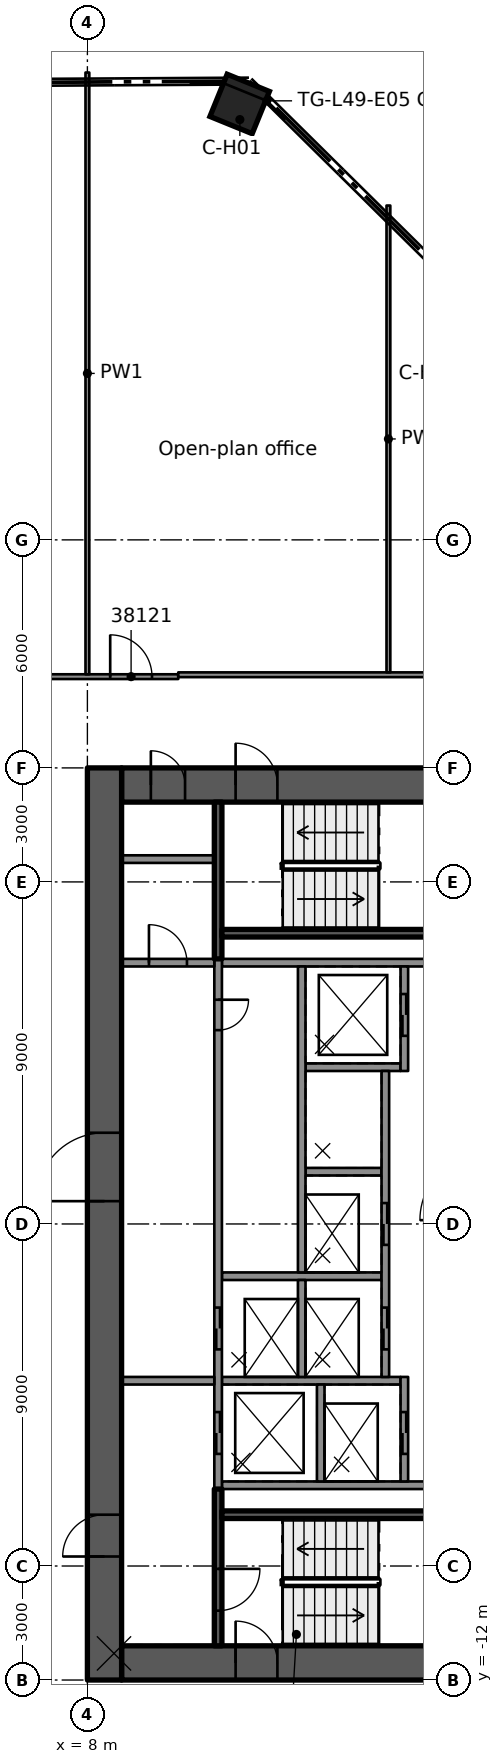
"""IFC4 building model, lengths in metres.
Left out: names, types, materials, properties, quantities, classifications, styles, units other than length and angle.
Written with IfcOpenShell. Run it as: python <this file> out.ifc"""

import sys

from ifc_helpers import new_model, si_unit, direction, frame, frame_2d, origin, origin_2d, place, context, subcontext, project, spatial, rectangle, extrude, element, fill, save


model = new_model("IFC4")
c1 = context("Model", 3, precision=1e-05, world=origin(), true_north=direction((0.0, 1.0)))
c2 = subcontext(c1, "Body", "Model", "MODEL_VIEW")
j1 = project(units=[si_unit("LENGTHUNIT", "METRE"), si_unit("PLANEANGLEUNIT", "RADIAN")], contexts=[c1])
p1 = place(None, origin())
s1 = spatial("IfcSite", under=j1, at=p1, CompositionType="ELEMENT")
p2 = place(p1, origin())
s2 = spatial("IfcBuilding", under=s1, at=p2, CompositionType="ELEMENT")
p3 = place(p2, frame((0.0, 0.0, 188.6)))
s3 = spatial("IfcBuildingStorey", under=s2, at=p3, CompositionType="ELEMENT", Elevation=188.6)
p4 = place(p3, frame((8.9, 11.55, 0.0), z_axis=(0.0, 0.0, 1.0), x_axis=(1.0, 0.0, 0.0)))
e1 = element("IfcWall", 1, at=p4, inside=s3, PredefinedType="SHEAR", context=c2, shape_type="SweptSolid", body=[
    extrude(rectangle(XDim=9.2, YDim=0.9, at=frame_2d((4.6, 0.0))), origin(), (0.0, 0.0, 1.0), 3.5),
])
p5 = place(p4, frame((3.0, 0.0, 0.0)))
e2 = element("IfcOpeningElement", 2, at=p5, cuts=e1, PredefinedType="OPENING", context=c2, shape_type="SweptSolid", body=[
    extrude(rectangle(XDim=1.1, YDim=2.1, at=frame_2d((0.55, 1.05))), frame((0.0, 0.46, 0.0), z_axis=(0.0, -1.0, 0.0), x_axis=(1.0, 0.0, 0.0)), (0.0, 0.0, 1.0), 0.92),
])
p6 = place(p4, frame((0.77, 0.0, 0.0)))
e3 = element("IfcOpeningElement", 3, at=p6, cuts=e1, PredefinedType="OPENING", context=c2, shape_type="SweptSolid", body=[
    extrude(rectangle(XDim=0.9, YDim=2.1, at=frame_2d((0.45, 1.05))), frame((0.0, 0.46, 0.0), z_axis=(0.0, -1.0, 0.0), x_axis=(1.0, 0.0, 0.0)), (0.0, 0.0, 1.0), 0.92),
])
p7 = place(p3, frame((8.9, -11.55, 0.0), z_axis=(0.0, 0.0, 1.0), x_axis=(1.0, 0.0, 0.0)))
e4 = element("IfcWall", 4, at=p7, inside=s3, PredefinedType="SHEAR", context=c2, shape_type="SweptSolid", body=[
    extrude(rectangle(XDim=9.2, YDim=0.9, at=frame_2d((4.6, 0.0))), origin(), (0.0, 0.0, 1.0), 3.5),
])
p8 = place(p7, frame((3.0, 0.0, 0.0)))
e5 = element("IfcOpeningElement", 5, at=p8, cuts=e4, PredefinedType="OPENING", context=c2, shape_type="SweptSolid", body=[
    extrude(rectangle(XDim=1.1, YDim=2.1, at=frame_2d((0.55, 1.05))), frame((0.0, 0.46, 0.0), z_axis=(0.0, -1.0, 0.0), x_axis=(1.0, 0.0, 0.0)), (0.0, 0.0, 1.0), 0.92),
])
p9 = place(p3, frame((8.45, -12.0, 0.0), z_axis=(0.0, 0.0, 1.0), x_axis=(0.0, 1.0, 0.0)))
e6 = element("IfcWall", 6, at=p9, inside=s3, PredefinedType="SHEAR", context=c2, shape_type="SweptSolid", body=[
    extrude(rectangle(XDim=24.0, YDim=0.9, at=frame_2d((12.0, 0.0))), origin(), (0.0, 0.0, 1.0), 3.5),
])
p10 = place(p9, frame((12.6, 0.0, 0.0)))
e7 = element("IfcOpeningElement", 7, at=p10, cuts=e6, PredefinedType="OPENING", context=c2, shape_type="SweptSolid", body=[
    extrude(rectangle(XDim=1.8, YDim=2.1, at=frame_2d((0.9, 1.05))), frame((0.0, 0.46, 0.0), z_axis=(0.0, -1.0, 0.0), x_axis=(1.0, 0.0, 0.0)), (0.0, 0.0, 1.0), 0.92),
])
p11 = place(p9, frame((3.25, 0.0, 0.0)))
e8 = element("IfcOpeningElement", 8, at=p11, cuts=e6, PredefinedType="OPENING", context=c2, shape_type="SweptSolid", body=[
    extrude(rectangle(XDim=1.1, YDim=2.1, at=frame_2d((0.55, 1.05))), frame((0.0, 0.46, 0.0), z_axis=(0.0, -1.0, 0.0), x_axis=(1.0, 0.0, 0.0)), (0.0, 0.0, 1.0), 0.92),
])
p12 = place(p3, frame((12.007, 29.47, 0.0), z_axis=(0.0, 0.0, 1.0), x_axis=(0.377323624231, 0.926081466501, 0.0)))
e9 = element("IfcColumn", 9, at=p12, inside=s3, PredefinedType="COLUMN", context=c2, shape_type="SweptSolid", body=[
    extrude(rectangle(XDim=1.2, YDim=1.2, at=origin_2d()), origin(), (0.0, 0.0, 1.0), 3.5),
])
for number, where, z_axis, x_axis in (
    (10, (11.54, -6.875, 0.0), (0.0, 0.0, 1.0), (1.0, 0.0, 0.0)),
    (11, (11.54, 6.875, 0.0), (0.0, 0.0, 1.0), (1.0, 0.0, 0.0)),
):
    element("IfcWall", number, at=place(p3, frame(where, z_axis=z_axis, x_axis=x_axis)), inside=s3, PredefinedType="SOLIDWALL", context=c2, shape_type="SweptSolid", body=[
        extrude(rectangle(XDim=6.56, YDim=0.2, at=frame_2d((3.28, 0.0))), origin(), (0.0, 0.0, 1.0), 3.08),
    ])
p13 = place(p3, frame((13.74, 4.125, 0.0), z_axis=(0.0, 0.0, 1.0), x_axis=(1.0, 0.0, 0.0)))
e12 = element("IfcWall", 12, at=p13, inside=s3, PredefinedType="SOLIDWALL", context=c2, shape_type="SweptSolid", body=[
    extrude(rectangle(XDim=2.5, YDim=0.2, at=frame_2d((1.25, 0.0))), origin(), (0.0, 0.0, 1.0), 3.08),
])
p14 = place(p3, frame((13.74, 1.375, 0.0), z_axis=(0.0, 0.0, 1.0), x_axis=(1.0, 0.0, 0.0)))
e13 = element("IfcWall", 13, at=p14, inside=s3, PredefinedType="SOLIDWALL", context=c2, shape_type="SweptSolid", body=[
    extrude(rectangle(XDim=2.0, YDim=0.2, at=frame_2d((1.0, 0.0))), origin(), (0.0, 0.0, 1.0), 3.08),
])
p15 = place(p3, frame((11.54, -1.375, 0.0), z_axis=(0.0, 0.0, 1.0), x_axis=(1.0, 0.0, 0.0)))
e14 = element("IfcWall", 14, at=p15, inside=s3, PredefinedType="SOLIDWALL", context=c2, shape_type="SweptSolid", body=[
    extrude(rectangle(XDim=4.2, YDim=0.2, at=frame_2d((2.1, 0.0))), origin(), (0.0, 0.0, 1.0), 3.08),
])
p16 = place(p3, frame((11.54, -4.125, 0.0), z_axis=(0.0, 0.0, 1.0), x_axis=(1.0, 0.0, 0.0)))
e15 = element("IfcWall", 15, at=p16, inside=s3, PredefinedType="SOLIDWALL", context=c2, shape_type="SweptSolid", body=[
    extrude(rectangle(XDim=4.7, YDim=0.2, at=frame_2d((2.35, 0.0))), origin(), (0.0, 0.0, 1.0), 3.08),
])
p17 = place(p3, frame((11.44, 6.975, 0.0), z_axis=(0.0, 0.0, 1.0), x_axis=(0.0, -1.0, 0.0)))
e16 = element("IfcWall", 16, at=p17, inside=s3, PredefinedType="SOLIDWALL", context=c2, shape_type="SweptSolid", body=[
    extrude(rectangle(XDim=13.95, YDim=0.2, at=frame_2d((6.975, 0.0))), origin(), (0.0, 0.0, 1.0), 3.08),
])
p18 = place(p17, frame((9.175, 0.0, 0.0)))
e17 = element("IfcOpeningElement", 17, at=p18, cuts=e16, PredefinedType="OPENING", context=c2, shape_type="SweptSolid", body=[
    extrude(rectangle(XDim=1.1, YDim=2.1, at=frame_2d((0.55, 1.05))), frame((0.0, 0.11, 0.0), z_axis=(0.0, -1.0, 0.0), x_axis=(1.0, 0.0, 0.0)), (0.0, 0.0, 1.0), 0.22),
])
p19 = place(p17, frame((11.925, 0.0, 0.0)))
e18 = element("IfcOpeningElement", 18, at=p19, cuts=e16, PredefinedType="OPENING", context=c2, shape_type="SweptSolid", body=[
    extrude(rectangle(XDim=1.1, YDim=2.1, at=frame_2d((0.55, 1.05))), frame((0.0, 0.11, 0.0), z_axis=(0.0, -1.0, 0.0), x_axis=(1.0, 0.0, 0.0)), (0.0, 0.0, 1.0), 0.22),
])
p20 = place(p17, frame((1.075, 0.0, 0.0)))
e19 = element("IfcOpeningElement", 19, at=p20, cuts=e16, PredefinedType="OPENING", context=c2, shape_type="SweptSolid", body=[
    extrude(rectangle(XDim=0.8, YDim=2.1, at=frame_2d((0.4, 1.05))), frame((0.0, 0.11, 0.0), z_axis=(0.0, -1.0, 0.0), x_axis=(1.0, 0.0, 0.0)), (0.0, 0.0, 1.0), 0.22),
])
p21 = place(p3, frame((13.64, 6.775, 0.0), z_axis=(0.0, 0.0, 1.0), x_axis=(0.0, -1.0, 0.0)))
e20 = element("IfcWall", 20, at=p21, inside=s3, PredefinedType="SOLIDWALL", context=c2, shape_type="SweptSolid", body=[
    extrude(rectangle(XDim=8.05, YDim=0.2, at=frame_2d((4.025, 0.0))), origin(), (0.0, 0.0, 1.0), 3.08),
])
for number, where, z_axis, x_axis in (
    (21, (13.64, -1.475, 0.0), (0.0, 0.0, 1.0), (0.0, -1.0, 0.0)),
    (22, (14.14, -4.225, 0.0), (0.0, 0.0, 1.0), (0.0, -1.0, 0.0)),
):
    element("IfcWall", number, at=place(p3, frame(where, z_axis=z_axis, x_axis=x_axis)), inside=s3, PredefinedType="SOLIDWALL", context=c2, shape_type="SweptSolid", body=[
        extrude(rectangle(XDim=2.55, YDim=0.2, at=frame_2d((1.275, 0.0))), origin(), (0.0, 0.0, 1.0), 3.08),
    ])
p22 = place(p3, frame((16.34, 6.775, 0.0), z_axis=(0.0, 0.0, 1.0), x_axis=(0.0, -1.0, 0.0)))
e23 = element("IfcWall", 23, at=p22, inside=s3, PredefinedType="SOLIDWALL", context=c2, shape_type="SweptSolid", body=[
    extrude(rectangle(XDim=2.75, YDim=0.2, at=frame_2d((1.375, 0.0))), origin(), (0.0, 0.0, 1.0), 3.08),
])
p23 = place(p22, frame((0.725, 0.0, 0.0)))
e24 = element("IfcOpeningElement", 24, at=p23, cuts=e23, PredefinedType="OPENING", context=c2, shape_type="SweptSolid", body=[
    extrude(rectangle(XDim=1.1, YDim=2.1, at=frame_2d((0.55, 1.05))), frame((0.0, 0.11, 0.0), z_axis=(0.0, -1.0, 0.0), x_axis=(1.0, 0.0, 0.0)), (0.0, 0.0, 1.0), 0.22),
])
p24 = place(p3, frame((15.84, 4.025, 0.0), z_axis=(0.0, 0.0, 1.0), x_axis=(0.0, -1.0, 0.0)))
e25 = element("IfcWall", 25, at=p24, inside=s3, PredefinedType="SOLIDWALL", context=c2, shape_type="SweptSolid", body=[
    extrude(rectangle(XDim=8.05, YDim=0.2, at=frame_2d((4.025, 0.0))), origin(), (0.0, 0.0, 1.0), 3.08),
])
p25 = place(p24, frame((3.475, 0.0, 0.0)))
e26 = element("IfcOpeningElement", 26, at=p25, cuts=e25, PredefinedType="OPENING", context=c2, shape_type="SweptSolid", body=[
    extrude(rectangle(XDim=1.1, YDim=2.1, at=frame_2d((0.55, 1.05))), frame((0.0, 0.11, 0.0), z_axis=(0.0, -1.0, 0.0), x_axis=(1.0, 0.0, 0.0)), (0.0, 0.0, 1.0), 0.22),
])
p26 = place(p24, frame((6.225, 0.0, 0.0)))
e27 = element("IfcOpeningElement", 27, at=p26, cuts=e25, PredefinedType="OPENING", context=c2, shape_type="SweptSolid", body=[
    extrude(rectangle(XDim=1.1, YDim=2.1, at=frame_2d((0.55, 1.05))), frame((0.0, 0.11, 0.0), z_axis=(0.0, -1.0, 0.0), x_axis=(1.0, 0.0, 0.0)), (0.0, 0.0, 1.0), 0.22),
])
p27 = place(p3, frame((16.34, -4.025, 0.0), z_axis=(0.0, 0.0, 1.0), x_axis=(0.0, -1.0, 0.0)))
e28 = element("IfcWall", 28, at=p27, inside=s3, PredefinedType="SOLIDWALL", context=c2, shape_type="SweptSolid", body=[
    extrude(rectangle(XDim=2.75, YDim=0.2, at=frame_2d((1.375, 0.0))), origin(), (0.0, 0.0, 1.0), 3.08),
])
p28 = place(p27, frame((0.925, 0.0, 0.0)))
e29 = element("IfcOpeningElement", 29, at=p28, cuts=e28, PredefinedType="OPENING", context=c2, shape_type="SweptSolid", body=[
    extrude(rectangle(XDim=1.1, YDim=2.1, at=frame_2d((0.55, 1.05))), frame((0.0, 0.11, 0.0), z_axis=(0.0, -1.0, 0.0), x_axis=(1.0, 0.0, 0.0)), (0.0, 0.0, 1.0), 0.22),
])
p29 = place(p3, frame((11.44, -6.975, 0.0), z_axis=(0.0, 0.0, 1.0), x_axis=(0.0, -1.0, 0.0)))
e30 = element("IfcWall", 30, at=p29, inside=s3, PredefinedType="SOLIDWALL", context=c2, shape_type="SweptSolid", body=[
    extrude(rectangle(XDim=4.125, YDim=0.2, at=frame_2d((2.062, 0.0))), origin(), (0.0, 0.0, 1.0), 3.08),
])
p30 = place(p29, frame((2.1, 0.0, 0.0)))
e31 = element("IfcOpeningElement", 31, at=p30, cuts=e30, PredefinedType="OPENING", context=c2, shape_type="SweptSolid", body=[
    extrude(rectangle(XDim=1.1, YDim=2.1, at=frame_2d((0.55, 1.05))), frame((0.0, 0.11, 0.0), z_axis=(0.0, -1.0, 0.0), x_axis=(1.0, 0.0, 0.0)), (0.0, 0.0, 1.0), 0.22),
])
p31 = place(p3, frame((11.54, -7.65, 0.0), z_axis=(0.0, 0.0, 1.0), x_axis=(1.0, 0.0, 0.0)))
e32 = element("IfcWall", 32, at=p31, inside=s3, PredefinedType="SOLIDWALL", context=c2, shape_type="SweptSolid", body=[
    extrude(rectangle(XDim=6.56, YDim=0.2, at=frame_2d((3.28, 0.0))), origin(), (0.0, 0.0, 1.0), 3.08),
])
p32 = place(p3, frame((11.44, 11.1, 0.0), z_axis=(0.0, 0.0, 1.0), x_axis=(0.0, -1.0, 0.0)))
e33 = element("IfcWall", 33, at=p32, inside=s3, PredefinedType="SOLIDWALL", context=c2, shape_type="SweptSolid", body=[
    extrude(rectangle(XDim=4.125, YDim=0.2, at=frame_2d((2.062, 0.0))), origin(), (0.0, 0.0, 1.0), 3.08),
])
p33 = place(p3, frame((11.54, 7.65, 0.0), z_axis=(0.0, 0.0, 1.0), x_axis=(1.0, 0.0, 0.0)))
e34 = element("IfcWall", 34, at=p33, inside=s3, PredefinedType="SOLIDWALL", context=c2, shape_type="SweptSolid", body=[
    extrude(rectangle(XDim=6.56, YDim=0.2, at=frame_2d((3.28, 0.0))), origin(), (0.0, 0.0, 1.0), 3.08),
])
p34 = place(p3, frame((8.9, -4.125, 0.0), z_axis=(0.0, 0.0, 1.0), x_axis=(1.0, 0.0, 0.0)))
e35 = element("IfcWall", 35, at=p34, inside=s3, PredefinedType="PARTITIONING", context=c2, shape_type="SweptSolid", body=[
    extrude(rectangle(XDim=2.44, YDim=0.2, at=frame_2d((1.22, 0.0))), origin(), (0.0, 0.0, 1.0), 3.08),
])
p35 = place(p3, frame((8.9, 6.875, 0.0), z_axis=(0.0, 0.0, 1.0), x_axis=(1.0, 0.0, 0.0)))
e36 = element("IfcWall", 36, at=p35, inside=s3, PredefinedType="PARTITIONING", context=c2, shape_type="SweptSolid", body=[
    extrude(rectangle(XDim=2.44, YDim=0.2, at=frame_2d((1.22, 0.0))), origin(), (0.0, 0.0, 1.0), 3.08),
])
p36 = place(p35, frame((0.72, 0.0, 0.0)))
e37 = element("IfcOpeningElement", 37, at=p36, cuts=e36, PredefinedType="OPENING", context=c2, shape_type="SweptSolid", body=[
    extrude(rectangle(XDim=1.0, YDim=2.1, at=frame_2d((0.5, 1.05))), frame((0.0, 0.11, 0.0), z_axis=(0.0, -1.0, 0.0), x_axis=(1.0, 0.0, 0.0)), (0.0, 0.0, 1.0), 0.22),
])
p37 = place(p3, frame((8.9, 9.6, 0.0), z_axis=(0.0, 0.0, 1.0), x_axis=(1.0, 0.0, 0.0)))
e38 = element("IfcWall", 38, at=p37, inside=s3, PredefinedType="PARTITIONING", context=c2, shape_type="SweptSolid", body=[
    extrude(rectangle(XDim=2.44, YDim=0.2, at=frame_2d((1.22, 0.0))), origin(), (0.0, 0.0, 1.0), 3.08),
])
p38 = place(p3, frame((-10.39, 14.401, 0.0), z_axis=(0.0, 0.0, 1.0), x_axis=(1.0, 0.0, 0.0)))
e39 = element("IfcWall", 39, at=p38, inside=s3, PredefinedType="PARTITIONING", context=c2, shape_type="SweptSolid", body=[
    extrude(rectangle(XDim=20.781, YDim=0.125, at=frame_2d((10.391, 0.0))), origin(), (0.0, 0.0, 1.0), 3.06),
])
p39 = place(p38, frame((18.99, 0.0, 0.0)))
e40 = element("IfcOpeningElement", 40, at=p39, cuts=e39, PredefinedType="OPENING", context=c2, shape_type="SweptSolid", body=[
    extrude(rectangle(XDim=1.1, YDim=2.1, at=frame_2d((0.55, 1.05))), frame((0.0, 0.073, 0.0), z_axis=(0.0, -1.0, 0.0), x_axis=(1.0, 0.0, 0.0)), (0.0, 0.0, 1.0), 0.145),
])
p40 = place(p38, frame((13.49, 0.0, 0.0)))
e41 = element("IfcOpeningElement", 41, at=p40, cuts=e39, PredefinedType="OPENING", context=c2, shape_type="SweptSolid", body=[
    extrude(rectangle(XDim=1.8, YDim=2.1, at=frame_2d((0.9, 1.05))), frame((0.0, 0.073, 0.0), z_axis=(0.0, -1.0, 0.0), x_axis=(1.0, 0.0, 0.0)), (0.0, 0.0, 1.0), 0.145),
])
p41 = place(p38, frame((5.49, 0.0, 0.0)))
e42 = element("IfcOpeningElement", 42, at=p41, cuts=e39, PredefinedType="OPENING", context=c2, shape_type="SweptSolid", body=[
    extrude(rectangle(XDim=1.8, YDim=2.1, at=frame_2d((0.9, 1.05))), frame((0.0, 0.073, 0.0), z_axis=(0.0, -1.0, 0.0), x_axis=(1.0, 0.0, 0.0)), (0.0, 0.0, 1.0), 0.145),
])
p42 = place(p38, frame((0.6, 0.0, 0.0)))
e43 = element("IfcOpeningElement", 43, at=p42, cuts=e39, PredefinedType="OPENING", context=c2, shape_type="SweptSolid", body=[
    extrude(rectangle(XDim=1.1, YDim=2.1, at=frame_2d((0.55, 1.05))), frame((0.0, 0.073, 0.0), z_axis=(0.0, -1.0, 0.0), x_axis=(1.0, 0.0, 0.0)), (0.0, 0.0, 1.0), 0.145),
])
p43 = place(p3, frame((10.391, 14.451, 0.0), z_axis=(0.0, 0.0, 1.0), x_axis=(1.0, 0.0, 0.0)))
e44 = element("IfcWall", 44, at=p43, inside=s3, PredefinedType="PARTITIONING", context=c2, shape_type="SweptSolid", body=[
    extrude(rectangle(XDim=10.996, YDim=0.125, at=frame_2d((5.498, 0.0))), origin(), (0.0, 0.0, 1.0), 3.06),
])
p44 = place(p43, frame((7.38, 0.0, 0.0)))
e45 = element("IfcOpeningElement", 45, at=p44, cuts=e44, PredefinedType="OPENING", context=c2, shape_type="SweptSolid", body=[
    extrude(rectangle(XDim=1.8, YDim=2.1, at=frame_2d((0.9, 1.05))), frame((0.0, 0.073, 0.0), z_axis=(0.0, -1.0, 0.0), x_axis=(1.0, 0.0, 0.0)), (0.0, 0.0, 1.0), 0.145),
])
p45 = place(p3, frame((15.921, 14.514, 0.0), z_axis=(0.0, 0.0, 1.0), x_axis=(0.0, 1.0, 0.0)))
e46 = element("IfcWall", 46, at=p45, inside=s3, PredefinedType="PARTITIONING", context=c2, shape_type="SweptSolid", body=[
    extrude(rectangle(XDim=12.283, YDim=0.1, at=frame_2d((6.142, 0.0))), origin(), (0.0, 0.0, 1.0), 3.06),
])
p46 = place(p3, frame((8.0, 14.463, 0.0), z_axis=(0.0, 0.0, 1.0), x_axis=(0.0, 1.0, 0.0)))
e47 = element("IfcWall", 47, at=p46, inside=s3, PredefinedType="PARTITIONING", context=c2, shape_type="SweptSolid", body=[
    extrude(rectangle(XDim=15.834, YDim=0.1, at=frame_2d((7.917, 0.0))), origin(), (0.0, 0.0, 1.0), 3.06),
])
p47 = place(p23, origin())
e48 = element("IfcDoor", 48, at=p47, inside=s3, OperationType="DOUBLE_DOOR_SLIDING", PredefinedType="DOOR", context=c2, shape_type="SweptSolid", body=[
    extrude(rectangle(XDim=1.1, YDim=2.1, at=frame_2d((0.55, 1.05))), frame((0.0, 0.025, 0.0), z_axis=(0.0, -1.0, 0.0), x_axis=(1.0, 0.0, 0.0)), (0.0, 0.0, 1.0), 0.05),
])
fill(e24, e48)
p48 = place(p25, origin())
e49 = element("IfcDoor", 49, at=p48, inside=s3, OperationType="DOUBLE_DOOR_SLIDING", PredefinedType="DOOR", context=c2, shape_type="SweptSolid", body=[
    extrude(rectangle(XDim=1.1, YDim=2.1, at=frame_2d((0.55, 1.05))), frame((0.0, 0.025, 0.0), z_axis=(0.0, -1.0, 0.0), x_axis=(1.0, 0.0, 0.0)), (0.0, 0.0, 1.0), 0.05),
])
fill(e26, e49)
p49 = place(p18, origin())
e50 = element("IfcDoor", 50, at=p49, inside=s3, OperationType="DOUBLE_DOOR_SLIDING", PredefinedType="DOOR", context=c2, shape_type="SweptSolid", body=[
    extrude(rectangle(XDim=1.1, YDim=2.1, at=frame_2d((0.55, 1.05))), frame((0.0, 0.025, 0.0), z_axis=(0.0, -1.0, 0.0), x_axis=(1.0, 0.0, 0.0)), (0.0, 0.0, 1.0), 0.05),
])
fill(e17, e50)
p50 = place(p26, origin())
e51 = element("IfcDoor", 51, at=p50, inside=s3, OperationType="DOUBLE_DOOR_SLIDING", PredefinedType="DOOR", context=c2, shape_type="SweptSolid", body=[
    extrude(rectangle(XDim=1.1, YDim=2.1, at=frame_2d((0.55, 1.05))), frame((0.0, 0.025, 0.0), z_axis=(0.0, -1.0, 0.0), x_axis=(1.0, 0.0, 0.0)), (0.0, 0.0, 1.0), 0.05),
])
fill(e27, e51)
p51 = place(p19, origin())
e52 = element("IfcDoor", 52, at=p51, inside=s3, OperationType="DOUBLE_DOOR_SLIDING", PredefinedType="DOOR", context=c2, shape_type="SweptSolid", body=[
    extrude(rectangle(XDim=1.1, YDim=2.1, at=frame_2d((0.55, 1.05))), frame((0.0, 0.025, 0.0), z_axis=(0.0, -1.0, 0.0), x_axis=(1.0, 0.0, 0.0)), (0.0, 0.0, 1.0), 0.05),
])
fill(e18, e52)
p52 = place(p28, origin())
e53 = element("IfcDoor", 53, at=p52, inside=s3, OperationType="DOUBLE_DOOR_SLIDING", PredefinedType="DOOR", context=c2, shape_type="SweptSolid", body=[
    extrude(rectangle(XDim=1.1, YDim=2.1, at=frame_2d((0.55, 1.05))), frame((0.0, 0.025, 0.0), z_axis=(0.0, -1.0, 0.0), x_axis=(1.0, 0.0, 0.0)), (0.0, 0.0, 1.0), 0.05),
])
fill(e29, e53)
p53 = place(p20, origin())
e54 = element("IfcDoor", 54, at=p53, inside=s3, OperationType="SINGLE_SWING_LEFT", PredefinedType="DOOR", context=c2, shape_type="SweptSolid", body=[
    extrude(rectangle(XDim=0.8, YDim=2.1, at=frame_2d((0.4, 1.05))), frame((0.0, 0.025, 0.0), z_axis=(0.0, -1.0, 0.0), x_axis=(1.0, 0.0, 0.0)), (0.0, 0.0, 1.0), 0.05),
])
fill(e19, e54)
p54 = place(p10, origin())
e55 = element("IfcDoor", 55, at=p54, inside=s3, OperationType="SINGLE_SWING_RIGHT", PredefinedType="DOOR", context=c2, shape_type="SweptSolid", body=[
    extrude(rectangle(XDim=1.8, YDim=2.1, at=frame_2d((0.9, 1.05))), frame((0.0, 0.025, 0.0), z_axis=(0.0, -1.0, 0.0), x_axis=(1.0, 0.0, 0.0)), (0.0, 0.0, 1.0), 0.05),
])
fill(e7, e55)
p55 = place(p11, origin())
e56 = element("IfcDoor", 56, at=p55, inside=s3, OperationType="SINGLE_SWING_LEFT", PredefinedType="DOOR", context=c2, shape_type="SweptSolid", body=[
    extrude(rectangle(XDim=1.1, YDim=2.1, at=frame_2d((0.55, 1.05))), frame((0.0, 0.025, 0.0), z_axis=(0.0, -1.0, 0.0), x_axis=(1.0, 0.0, 0.0)), (0.0, 0.0, 1.0), 0.05),
])
fill(e8, e56)
p56 = place(p8, origin())
e57 = element("IfcDoor", 57, at=p56, inside=s3, OperationType="SINGLE_SWING_LEFT", PredefinedType="DOOR", context=c2, shape_type="SweptSolid", body=[
    extrude(rectangle(XDim=1.1, YDim=2.1, at=frame_2d((0.55, 1.05))), frame((0.0, 0.025, 0.0), z_axis=(0.0, -1.0, 0.0), x_axis=(1.0, 0.0, 0.0)), (0.0, 0.0, 1.0), 0.05),
])
fill(e5, e57)
p57 = place(p5, origin())
e58 = element("IfcDoor", 58, at=p57, inside=s3, OperationType="SINGLE_SWING_LEFT", PredefinedType="DOOR", context=c2, shape_type="SweptSolid", body=[
    extrude(rectangle(XDim=1.1, YDim=2.1, at=frame_2d((0.55, 1.05))), frame((0.0, 0.025, 0.0), z_axis=(0.0, -1.0, 0.0), x_axis=(1.0, 0.0, 0.0)), (0.0, 0.0, 1.0), 0.05),
])
fill(e2, e58)
p58 = place(p30, origin())
e59 = element("IfcDoor", 59, at=p58, inside=s3, OperationType="SINGLE_SWING_RIGHT", PredefinedType="DOOR", context=c2, shape_type="SweptSolid", body=[
    extrude(rectangle(XDim=1.1, YDim=2.1, at=frame_2d((0.55, 1.05))), frame((0.0, 0.025, 0.0), z_axis=(0.0, -1.0, 0.0), x_axis=(1.0, 0.0, 0.0)), (0.0, 0.0, 1.0), 0.05),
])
fill(e31, e59)
p59 = place(p6, origin())
e60 = element("IfcDoor", 60, at=p59, inside=s3, OperationType="SINGLE_SWING_LEFT", PredefinedType="DOOR", context=c2, shape_type="SweptSolid", body=[
    extrude(rectangle(XDim=0.9, YDim=2.1, at=frame_2d((0.45, 1.05))), frame((0.0, 0.025, 0.0), z_axis=(0.0, -1.0, 0.0), x_axis=(1.0, 0.0, 0.0)), (0.0, 0.0, 1.0), 0.05),
])
fill(e3, e60)
p60 = place(p36, origin())
e61 = element("IfcDoor", 61, at=p60, inside=s3, OperationType="SINGLE_SWING_RIGHT", PredefinedType="DOOR", context=c2, shape_type="SweptSolid", body=[
    extrude(rectangle(XDim=1.0, YDim=2.1, at=frame_2d((0.5, 1.05))), frame((0.0, 0.025, 0.0), z_axis=(0.0, -1.0, 0.0), x_axis=(1.0, 0.0, 0.0)), (0.0, 0.0, 1.0), 0.05),
])
fill(e37, e61)
p61 = place(p39, origin())
e62 = element("IfcDoor", 62, at=p61, inside=s3, OperationType="SINGLE_SWING_RIGHT", PredefinedType="DOOR", context=c2, shape_type="SweptSolid", body=[
    extrude(rectangle(XDim=1.1, YDim=2.1, at=frame_2d((0.55, 1.05))), frame((0.0, 0.025, 0.0), z_axis=(0.0, -1.0, 0.0), x_axis=(1.0, 0.0, 0.0)), (0.0, 0.0, 1.0), 0.05),
])
fill(e40, e62)
save(model, sys.argv[1])
